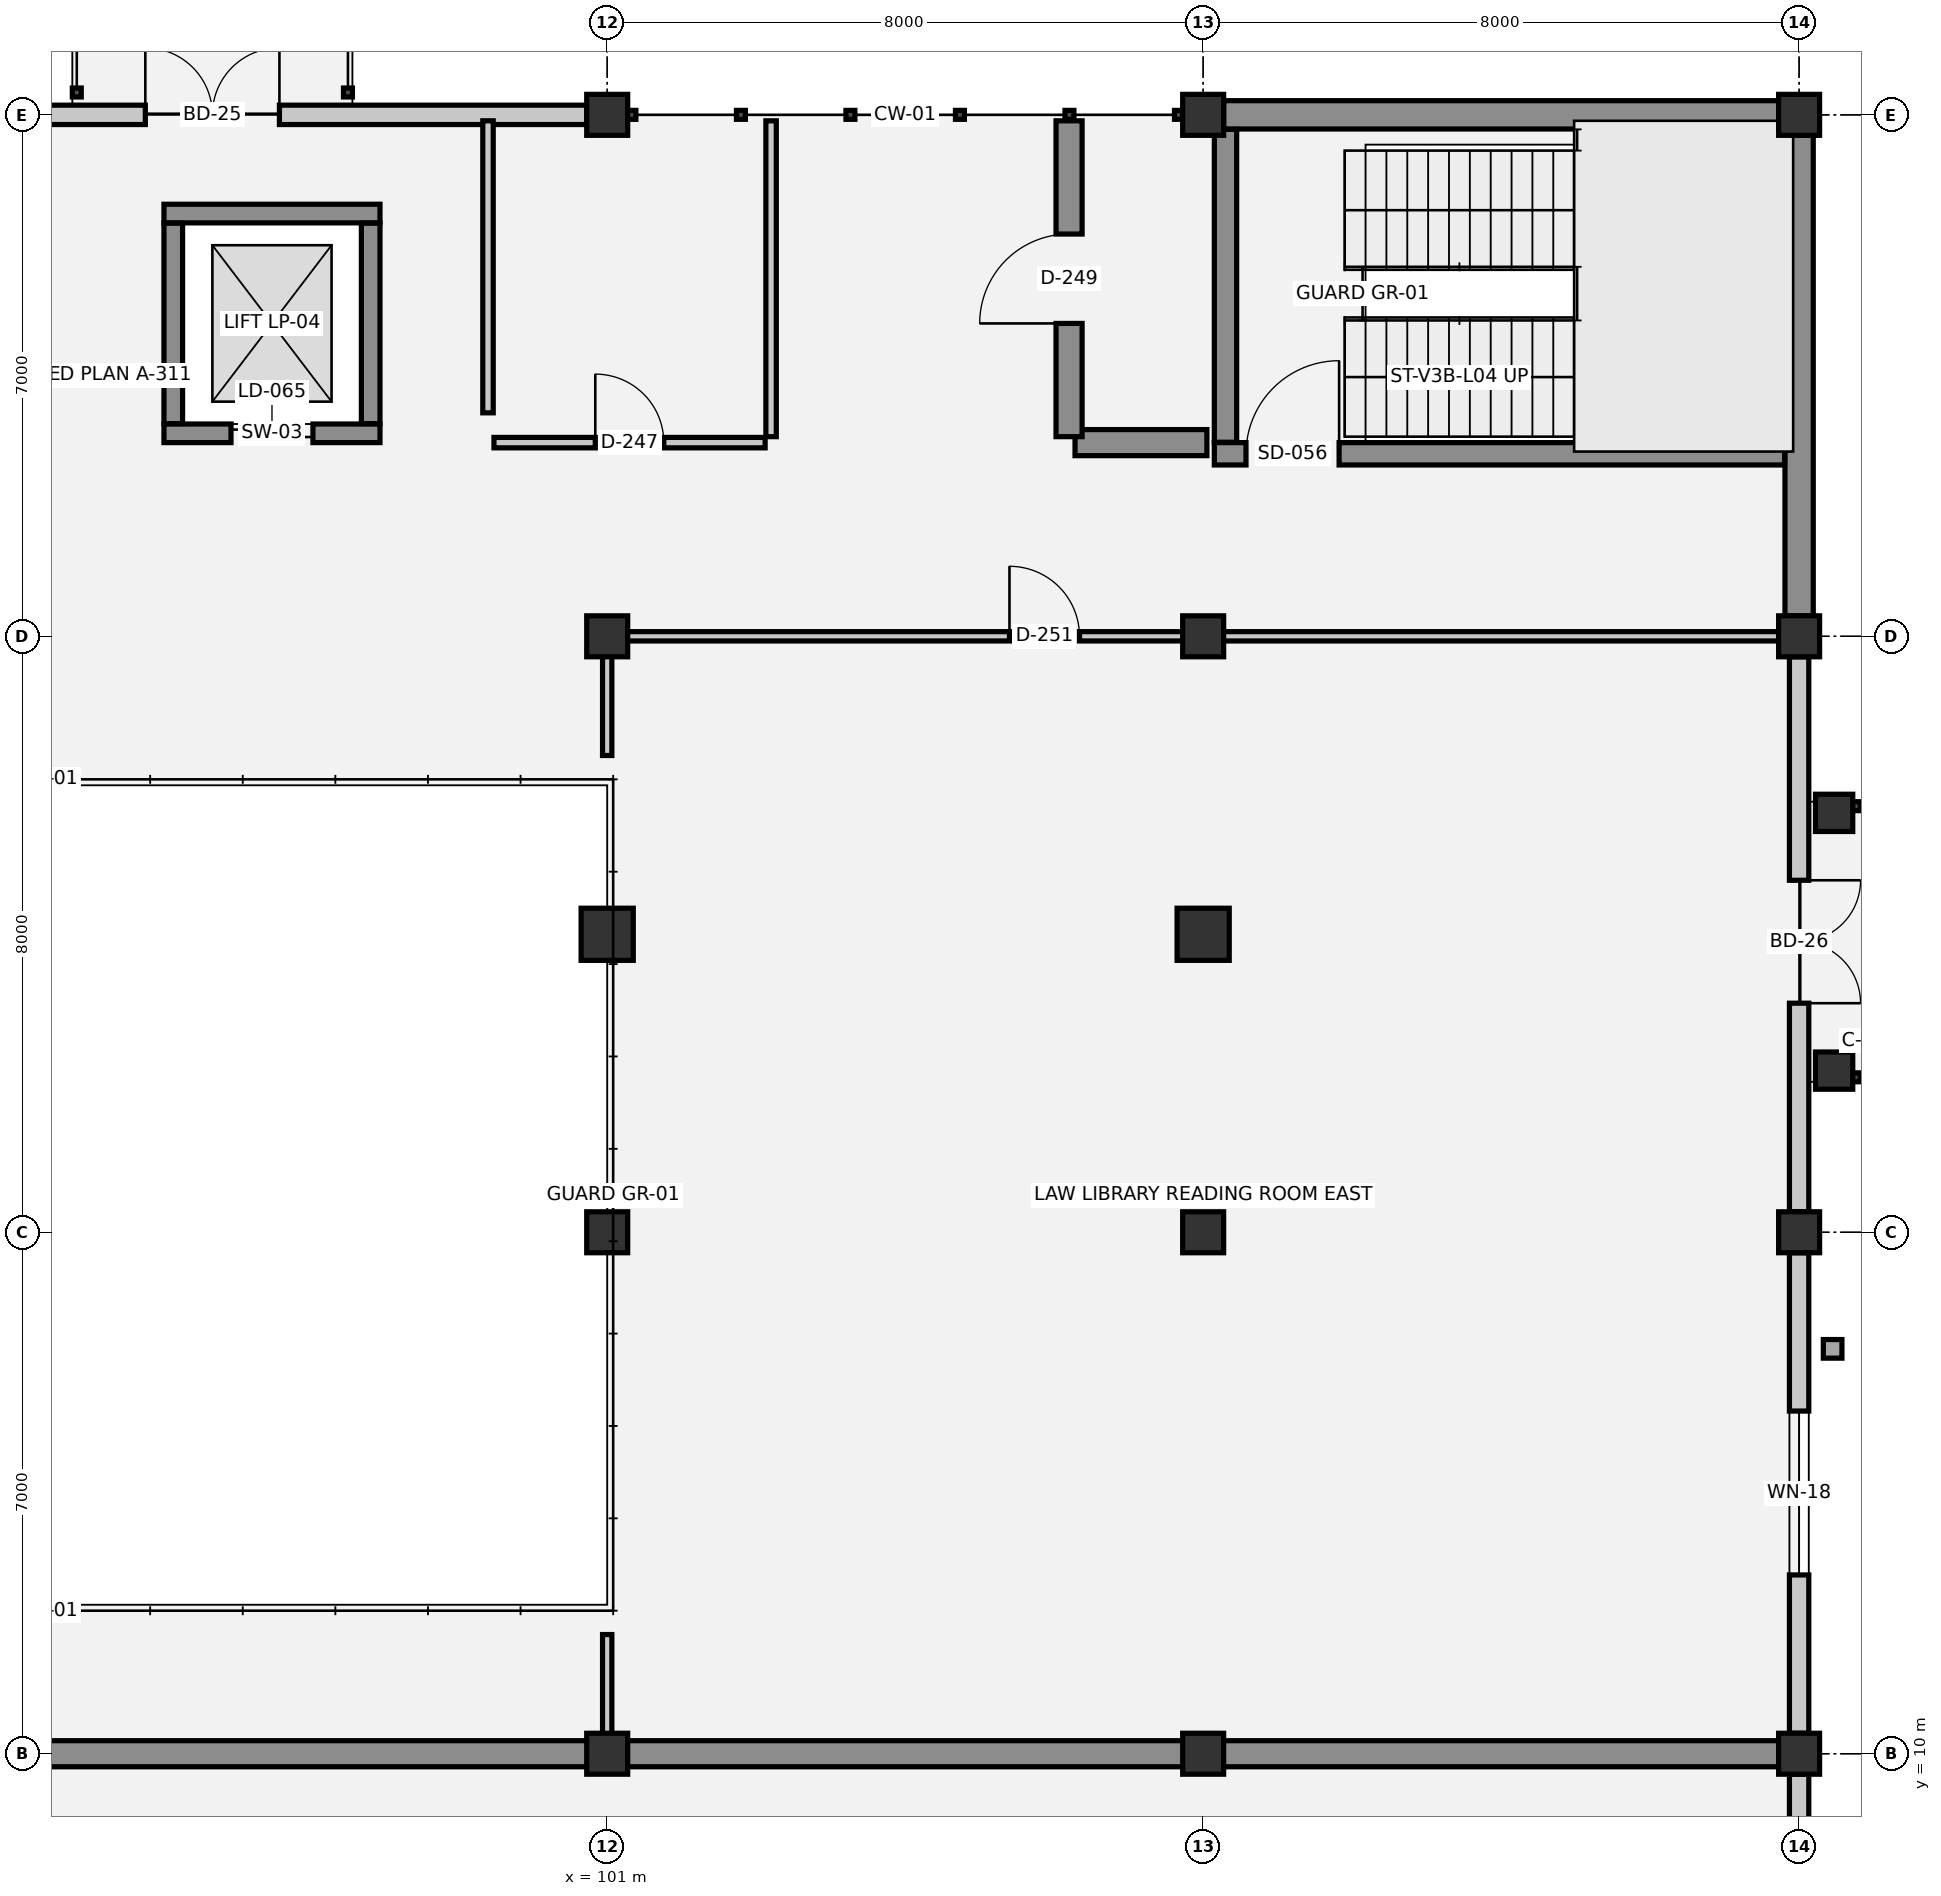
"""IFC4 building model, lengths in metres.
Left out: names, types, materials, properties, quantities, classifications, styles, units other than length and angle.
Written with IfcOpenShell. Run it as: python <this file> out.ifc"""

import sys

from ifc_helpers import new_model, si_unit, direction, frame, frame_2d, origin, origin_2d, place, context, subcontext, project, spatial, rectangle, circle, extrude, element, fill, save


model = new_model("IFC4")
c1 = context("Model", 3, precision=1e-05, world=origin(), true_north=direction((0.0, 1.0)))
c2 = subcontext(c1, "Body", "Model", "MODEL_VIEW")
j1 = project(units=[si_unit("LENGTHUNIT", "METRE"), si_unit("PLANEANGLEUNIT", "RADIAN")], contexts=[c1])
p1 = place(None, origin())
s1 = spatial("IfcSite", under=j1, at=p1, CompositionType="ELEMENT")
p2 = place(p1, origin())
s2 = spatial("IfcBuilding", under=s1, at=p2, CompositionType="ELEMENT")
p3 = place(p2, frame((0.0, 0.0, 14.4)))
s3 = spatial("IfcBuildingStorey", under=s2, at=p3, CompositionType="ELEMENT", Elevation=14.4)
for number, where, z_axis, x_axis in (
    (1, (101.0, 10.0, 0.0), (0.0, 0.0, 1.0), (1.0, 0.0, 0.0)),
    (2, (101.0, 17.0, 0.0), (0.0, 0.0, 1.0), (1.0, 0.0, 0.0)),
    (3, (101.0, 25.0, 0.0), (0.0, 0.0, 1.0), (1.0, 0.0, 0.0)),
    (4, (101.0, 32.0, 0.0), (0.0, 0.0, 1.0), (1.0, 0.0, 0.0)),
    (5, (109.0, 10.0, 0.0), (0.0, 0.0, 1.0), (1.0, 0.0, 0.0)),
    (6, (109.0, 17.0, 0.0), (0.0, 0.0, 1.0), (1.0, 0.0, 0.0)),
    (7, (109.0, 25.0, 0.0), (0.0, 0.0, 1.0), (1.0, 0.0, 0.0)),
    (8, (109.0, 32.0, 0.0), (0.0, 0.0, 1.0), (1.0, 0.0, 0.0)),
    (9, (117.0, 10.0, 0.0), (0.0, 0.0, 1.0), (1.0, 0.0, 0.0)),
    (10, (117.0, 17.0, 0.0), (0.0, 0.0, 1.0), (1.0, 0.0, 0.0)),
    (11, (117.0, 25.0, 0.0), (0.0, 0.0, 1.0), (1.0, 0.0, 0.0)),
    (12, (117.0, 32.0, 0.0), (0.0, 0.0, 1.0), (1.0, 0.0, 0.0)),
):
    element("IfcColumn", number, at=place(p3, frame(where, z_axis=z_axis, x_axis=x_axis)), inside=s3, PredefinedType="COLUMN", context=c2, shape_type="SweptSolid", body=[
        extrude(rectangle(XDim=0.55, YDim=0.55, at=origin_2d()), origin(), (0.0, 0.0, 1.0), 3.9),
    ])
for number, where, z_axis, x_axis in (
    (13, (101.0, 21.0, 0.0), (0.0, 0.0, 1.0), (1.0, 0.0, 0.0)),
    (14, (109.0, 21.0, 0.0), (0.0, 0.0, 1.0), (1.0, 0.0, 0.0)),
):
    element("IfcColumn", number, at=place(p3, frame(where, z_axis=z_axis, x_axis=x_axis)), inside=s3, PredefinedType="COLUMN", context=c2, shape_type="SweptSolid", body=[
        extrude(circle(Radius=0.35, at=origin_2d()), origin(), (0.0, 0.0, 1.0), 3.9),
    ])
for number, where, z_axis, x_axis in (
    (15, (117.47, 19.17, 0.0), (0.0, 0.0, 1.0), (1.0, 0.0, 0.0)),
    (16, (117.47, 22.63, 0.0), (0.0, 0.0, 1.0), (1.0, 0.0, 0.0)),
):
    element("IfcColumn", number, at=place(p3, frame(where, z_axis=z_axis, x_axis=x_axis)), inside=s3, PredefinedType="COLUMN", context=c2, shape_type="SweptSolid", body=[
        extrude(rectangle(XDim=0.5, YDim=0.5, at=origin_2d()), origin(), (0.0, 0.0, 1.0), 3.67),
    ])
p4 = place(p3, frame((93.275, 32.0, 0.0), z_axis=(0.0, 0.0, 1.0), x_axis=(1.0, 0.0, 0.0)))
e17 = element("IfcWall", 17, at=p4, inside=s3, PredefinedType="SOLIDWALL", context=c2, shape_type="SweptSolid", body=[
    extrude(rectangle(XDim=7.45, YDim=0.26, at=frame_2d((3.725, 0.0))), origin(), (0.0, 0.0, 1.0), 2.84),
])
p5 = place(p4, frame((1.525, 0.0, 0.0)))
e18 = element("IfcOpeningElement", 18, at=p5, cuts=e17, PredefinedType="OPENING", context=c2, shape_type="SweptSolid", body=[
    extrude(rectangle(XDim=1.8, YDim=2.25, at=frame_2d((0.9, 1.125))), frame((0.0, 0.14, 0.0), z_axis=(0.0, -1.0, 0.0), x_axis=(1.0, 0.0, 0.0)), (0.0, 0.0, 1.0), 0.28),
])
p6 = place(p3, frame((109.275, 32.0, 0.0), z_axis=(0.0, 0.0, 1.0), x_axis=(1.0, 0.0, 0.0)))
e19 = element("IfcWall", 19, at=p6, inside=s3, PredefinedType="STANDARD", context=c2, shape_type="SweptSolid", body=[
    extrude(rectangle(XDim=7.45, YDim=0.38, at=frame_2d((3.725, 0.0))), origin(), (0.0, 0.0, 1.0), 2.84),
])
p7 = place(p3, frame((117.0, 31.725, 0.0), z_axis=(0.0, 0.0, 1.0), x_axis=(0.0, -1.0, 0.0)))
e20 = element("IfcWall", 20, at=p7, inside=s3, PredefinedType="STANDARD", context=c2, shape_type="SweptSolid", body=[
    extrude(rectangle(XDim=6.45, YDim=0.38, at=frame_2d((3.225, 0.0))), origin(), (0.0, 0.0, 1.0), 2.84),
])
p8 = place(p3, frame((117.0, 24.725, 0.0), z_axis=(0.0, 0.0, 1.0), x_axis=(0.0, -1.0, 0.0)))
e21 = element("IfcWall", 21, at=p8, inside=s3, PredefinedType="SOLIDWALL", context=c2, shape_type="SweptSolid", body=[
    extrude(rectangle(XDim=7.45, YDim=0.26, at=frame_2d((3.725, 0.0))), origin(), (0.0, 0.0, 1.0), 2.84),
])
p9 = place(p8, frame((3.0, 0.0, 0.0)))
e22 = element("IfcOpeningElement", 22, at=p9, cuts=e21, PredefinedType="OPENING", context=c2, shape_type="SweptSolid", body=[
    extrude(rectangle(XDim=1.65, YDim=2.2, at=frame_2d((0.825, 1.1))), frame((0.0, 0.14, 0.0), z_axis=(0.0, -1.0, 0.0), x_axis=(1.0, 0.0, 0.0)), (0.0, 0.0, 1.0), 0.28),
])
p10 = place(p3, frame((117.0, 16.725, 0.0), z_axis=(0.0, 0.0, 1.0), x_axis=(0.0, -1.0, 0.0)))
e23 = element("IfcWall", 23, at=p10, inside=s3, PredefinedType="SOLIDWALL", context=c2, shape_type="SweptSolid", body=[
    extrude(rectangle(XDim=6.45, YDim=0.26, at=frame_2d((3.225, 0.0))), origin(), (0.0, 0.0, 1.0), 2.84),
])
p11 = place(p10, frame((2.125, 0.0, 0.9)))
e24 = element("IfcOpeningElement", 24, at=p11, cuts=e23, PredefinedType="OPENING", context=c2, shape_type="SweptSolid", body=[
    extrude(rectangle(XDim=2.2, YDim=1.0, at=frame_2d((1.1, 0.5))), frame((0.0, 0.14, 0.0), z_axis=(0.0, -1.0, 0.0), x_axis=(1.0, 0.0, 0.0)), (0.0, 0.0, 1.0), 0.28),
])
p12 = place(p3, frame((117.0, 9.725, 0.0), z_axis=(0.0, 0.0, 1.0), x_axis=(0.0, -1.0, 0.0)))
e25 = element("IfcWall", 25, at=p12, inside=s3, PredefinedType="SOLIDWALL", context=c2, shape_type="SweptSolid", body=[
    extrude(rectangle(XDim=5.45, YDim=0.26, at=frame_2d((2.725, 0.0))), origin(), (0.0, 0.0, 1.0), 2.84),
])
p13 = place(p12, frame((2.175, 0.0, 0.9)))
e26 = element("IfcOpeningElement", 26, at=p13, cuts=e25, PredefinedType="OPENING", context=c2, shape_type="SweptSolid", body=[
    extrude(rectangle(XDim=1.1, YDim=1.2, at=frame_2d((0.55, 0.6))), frame((0.0, 0.14, 0.0), z_axis=(0.0, -1.0, 0.0), x_axis=(1.0, 0.0, 0.0)), (0.0, 0.0, 1.0), 0.28),
])
p14 = place(p3, frame((95.05, 27.725, 0.0), z_axis=(0.0, 0.0, 1.0), x_axis=(1.0, 0.0, 0.0)))
e27 = element("IfcWall", 27, at=p14, inside=s3, PredefinedType="SHEAR", context=c2, shape_type="SweptSolid", body=[
    extrude(rectangle(XDim=2.9, YDim=0.25, at=frame_2d((1.45, 0.0))), origin(), (0.0, 0.0, 1.0), 3.9),
])
p15 = place(p14, frame((0.9, 0.0, 0.0)))
e28 = element("IfcOpeningElement", 28, at=p15, cuts=e27, PredefinedType="OPENING", context=c2, shape_type="SweptSolid", body=[
    extrude(rectangle(XDim=1.1, YDim=2.15, at=frame_2d((0.55, 1.075))), frame((0.0, 0.135, 0.0), z_axis=(0.0, -1.0, 0.0), x_axis=(1.0, 0.0, 0.0)), (0.0, 0.0, 1.0), 0.27),
])
p16 = place(p3, frame((97.95, 30.675, 0.0), z_axis=(0.0, 0.0, 1.0), x_axis=(-1.0, 0.0, 0.0)))
e29 = element("IfcWall", 29, at=p16, inside=s3, PredefinedType="SHEAR", context=c2, shape_type="SweptSolid", body=[
    extrude(rectangle(XDim=2.9, YDim=0.25, at=frame_2d((1.45, 0.0))), origin(), (0.0, 0.0, 1.0), 3.9),
])
for number, where, z_axis, x_axis in (
    (30, (95.175, 30.545, 0.0), (0.0, 0.0, 1.0), (0.0, -1.0, 0.0)),
    (31, (97.825, 27.855, 0.0), (0.0, 0.0, 1.0), (0.0, 1.0, 0.0)),
):
    element("IfcWall", number, at=place(p3, frame(where, z_axis=z_axis, x_axis=x_axis)), inside=s3, PredefinedType="SHEAR", context=c2, shape_type="SweptSolid", body=[
        extrude(rectangle(XDim=2.69, YDim=0.25, at=frame_2d((1.345, 0.0))), origin(), (0.0, 0.0, 1.0), 3.9),
    ])
p17 = place(p3, frame((109.15, 27.45, 0.0), z_axis=(0.0, 0.0, 1.0), x_axis=(1.0, 0.0, 0.0)))
e32 = element("IfcWall", 32, at=p17, inside=s3, PredefinedType="SHEAR", context=c2, shape_type="SweptSolid", body=[
    extrude(rectangle(XDim=7.655, YDim=0.3, at=frame_2d((3.828, 0.0))), origin(), (0.0, 0.0, 1.0), 3.56),
])
p18 = place(p17, frame((0.425, 0.0, 0.0)))
e33 = element("IfcOpeningElement", 33, at=p18, cuts=e32, PredefinedType="OPENING", context=c2, shape_type="SweptSolid", body=[
    extrude(rectangle(XDim=1.25, YDim=2.15, at=frame_2d((0.625, 1.075))), frame((0.0, 0.16, 0.0), z_axis=(0.0, -1.0, 0.0), x_axis=(1.0, 0.0, 0.0)), (0.0, 0.0, 1.0), 0.32),
])
p19 = place(p3, frame((109.3, 31.805, 0.0), z_axis=(0.0, 0.0, 1.0), x_axis=(0.0, -1.0, 0.0)))
e34 = element("IfcWall", 34, at=p19, inside=s3, PredefinedType="SHEAR", context=c2, shape_type="SweptSolid", body=[
    extrude(rectangle(XDim=4.2, YDim=0.3, at=frame_2d((2.1, 0.0))), origin(), (0.0, 0.0, 1.0), 3.56),
])
p20 = place(p3, frame((82.48, 10.0, 0.0), z_axis=(0.0, 0.0, 1.0), x_axis=(1.0, 0.0, 0.0)))
e35 = element("IfcWall", 35, at=p20, inside=s3, PredefinedType="SHEAR", context=c2, shape_type="SweptSolid", body=[
    extrude(rectangle(XDim=18.44, YDim=0.35, at=frame_2d((9.22, 0.0))), origin(), (0.0, 0.0, 1.0), 3.54),
])
p21 = place(p20, frame((6.139, 0.0, 0.0)))
e36 = element("IfcOpeningElement", 36, at=p21, cuts=e35, PredefinedType="OPENING", context=c2, shape_type="SweptSolid", body=[
    extrude(rectangle(XDim=1.2, YDim=2.15, at=frame_2d((0.6, 1.075))), frame((0.0, 0.185, 0.0), z_axis=(0.0, -1.0, 0.0), x_axis=(1.0, 0.0, 0.0)), (0.0, 0.0, 1.0), 0.37),
])
p22 = place(p3, frame((101.08, 10.0, 0.0), z_axis=(0.0, 0.0, 1.0), x_axis=(1.0, 0.0, 0.0)))
e37 = element("IfcWall", 37, at=p22, inside=s3, PredefinedType="SHEAR", context=c2, shape_type="SweptSolid", body=[
    extrude(rectangle(XDim=15.84, YDim=0.35, at=frame_2d((7.92, 0.0))), origin(), (0.0, 0.0, 1.0), 3.54),
])
p23 = place(p3, frame((101.08, 25.0, 0.0), z_axis=(0.0, 0.0, 1.0), x_axis=(1.0, 0.0, 0.0)))
e38 = element("IfcWall", 38, at=p23, inside=s3, PredefinedType="PARTITIONING", context=c2, shape_type="SweptSolid", body=[
    extrude(rectangle(XDim=15.84, YDim=0.125, at=frame_2d((7.92, 0.0))), origin(), (0.0, 0.0, 1.0), 2.96),
])
p24 = place(p23, frame((5.32, 0.0, 0.0)))
e39 = element("IfcOpeningElement", 39, at=p24, cuts=e38, PredefinedType="OPENING", context=c2, shape_type="SweptSolid", body=[
    extrude(rectangle(XDim=0.94, YDim=2.1, at=frame_2d((0.47, 1.05))), frame((0.0, 0.073, 0.0), z_axis=(0.0, -1.0, 0.0), x_axis=(1.0, 0.0, 0.0)), (0.0, 0.0, 1.0), 0.145),
])
p25 = place(p3, frame((99.48, 27.6, 0.0), z_axis=(0.0, 0.0, 1.0), x_axis=(1.0, 0.0, 0.0)))
e40 = element("IfcWall", 40, at=p25, inside=s3, PredefinedType="PLUMBINGWALL", context=c2, shape_type="SweptSolid", body=[
    extrude(rectangle(XDim=3.64, YDim=0.14, at=frame_2d((1.82, 0.0))), origin(), (0.0, 0.0, 1.0), 3.54),
])
p26 = place(p25, frame((1.36, 0.0, 0.0)))
e41 = element("IfcOpeningElement", 41, at=p26, cuts=e40, PredefinedType="OPENING", context=c2, shape_type="SweptSolid", body=[
    extrude(rectangle(XDim=0.92, YDim=2.1, at=frame_2d((0.46, 1.05))), frame((0.0, 0.08, 0.0), z_axis=(0.0, -1.0, 0.0), x_axis=(1.0, 0.0, 0.0)), (0.0, 0.0, 1.0), 0.16),
])
p27 = place(p3, frame((107.28, 27.6, 0.0), z_axis=(0.0, 0.0, 1.0), x_axis=(1.0, 0.0, 0.0)))
e42 = element("IfcWall", 42, at=p27, inside=s3, PredefinedType="SHEAR", context=c2, shape_type="SweptSolid", body=[
    extrude(rectangle(XDim=1.77, YDim=0.35, at=frame_2d((0.885, 0.0))), origin(), (0.0, 0.0, 1.0), 3.54),
])
p28 = place(p3, frame((99.4, 28.0, 0.0), z_axis=(0.0, 0.0, 1.0), x_axis=(0.0, 1.0, 0.0)))
e43 = element("IfcWall", 43, at=p28, inside=s3, PredefinedType="PLUMBINGWALL", context=c2, shape_type="SweptSolid", body=[
    extrude(rectangle(XDim=3.92, YDim=0.14, at=frame_2d((1.96, 0.0))), origin(), (0.0, 0.0, 1.0), 3.54),
])
for number, where, z_axis, x_axis in (
    (44, (101.0, 10.08, 0.0), (0.0, 0.0, 1.0), (0.0, 1.0, 0.0)),
    (45, (101.0, 23.4, 0.0), (0.0, 0.0, 1.0), (0.0, 1.0, 0.0)),
):
    element("IfcWall", number, at=place(p3, frame(where, z_axis=z_axis, x_axis=x_axis)), inside=s3, PredefinedType="PARTITIONING", context=c2, shape_type="SweptSolid", body=[
        extrude(rectangle(XDim=1.52, YDim=0.125, at=frame_2d((0.76, 0.0))), origin(), (0.0, 0.0, 1.0), 3.01),
    ])
p29 = place(p3, frame((103.2, 27.68, 0.0), z_axis=(0.0, 0.0, 1.0), x_axis=(0.0, 1.0, 0.0)))
e46 = element("IfcWall", 46, at=p29, inside=s3, PredefinedType="PLUMBINGWALL", context=c2, shape_type="SweptSolid", body=[
    extrude(rectangle(XDim=4.24, YDim=0.14, at=frame_2d((2.12, 0.0))), origin(), (0.0, 0.0, 1.0), 3.54),
])
p30 = place(p3, frame((107.2, 27.68, 0.0), z_axis=(0.0, 0.0, 1.0), x_axis=(0.0, 1.0, 0.0)))
e47 = element("IfcWall", 47, at=p30, inside=s3, PredefinedType="SHEAR", context=c2, shape_type="SweptSolid", body=[
    extrude(rectangle(XDim=4.24, YDim=0.35, at=frame_2d((2.12, 0.0))), origin(), (0.0, 0.0, 1.0), 3.54),
])
p31 = place(p30, frame((1.52, 0.0, 0.0)))
e48 = element("IfcOpeningElement", 48, at=p31, cuts=e47, PredefinedType="OPENING", context=c2, shape_type="SweptSolid", body=[
    extrude(rectangle(XDim=1.2, YDim=2.15, at=frame_2d((0.6, 1.075))), frame((0.0, 0.185, 0.0), z_axis=(0.0, -1.0, 0.0), x_axis=(1.0, 0.0, 0.0)), (0.0, 0.0, 1.0), 0.37),
])
p32 = place(p5, origin())
e49 = element("IfcDoor", 49, at=p32, inside=s3, OperationType="DOUBLE_DOOR_SINGLE_SWING", PredefinedType="DOOR", context=c2, shape_type="SweptSolid", body=[
    extrude(rectangle(XDim=1.8, YDim=2.25, at=frame_2d((0.9, 1.125))), frame((0.0, 0.025, 0.0), z_axis=(0.0, -1.0, 0.0), x_axis=(1.0, 0.0, 0.0)), (0.0, 0.0, 1.0), 0.05),
])
fill(e18, e49)
p33 = place(p9, origin())
e50 = element("IfcDoor", 50, at=p33, inside=s3, OperationType="DOUBLE_DOOR_SINGLE_SWING", PredefinedType="DOOR", context=c2, shape_type="SweptSolid", body=[
    extrude(rectangle(XDim=1.65, YDim=2.2, at=frame_2d((0.825, 1.1))), frame((0.0, 0.025, 0.0), z_axis=(0.0, -1.0, 0.0), x_axis=(1.0, 0.0, 0.0)), (0.0, 0.0, 1.0), 0.05),
])
fill(e22, e50)
p34 = place(p11, origin())
e51 = element("IfcWindow", 51, at=p34, inside=s3, PartitioningType="SINGLE_PANEL", PredefinedType="WINDOW", context=c2, shape_type="SweptSolid", body=[
    extrude(rectangle(XDim=2.2, YDim=1.0, at=frame_2d((1.1, 0.5))), frame((0.0, 0.03, 0.0), z_axis=(0.0, -1.0, 0.0), x_axis=(1.0, 0.0, 0.0)), (0.0, 0.0, 1.0), 0.06),
])
fill(e24, e51)
p35 = place(p15, origin())
e52 = element("IfcDoor", 52, at=p35, inside=s3, OperationType="DOUBLE_DOOR_SLIDING", PredefinedType="DOOR", context=c2, shape_type="SweptSolid", body=[
    extrude(rectangle(XDim=1.1, YDim=2.15, at=frame_2d((0.55, 1.075))), frame((0.0, 0.025, 0.0), z_axis=(0.0, -1.0, 0.0), x_axis=(1.0, 0.0, 0.0)), (0.0, 0.0, 1.0), 0.05),
])
fill(e28, e52)
p36 = place(p18, origin())
e53 = element("IfcDoor", 53, at=p36, inside=s3, OperationType="SINGLE_SWING_RIGHT", PredefinedType="DOOR", context=c2, shape_type="SweptSolid", body=[
    extrude(rectangle(XDim=1.25, YDim=2.15, at=frame_2d((0.625, 1.075))), frame((0.0, 0.025, 0.0), z_axis=(0.0, -1.0, 0.0), x_axis=(1.0, 0.0, 0.0)), (0.0, 0.0, 1.0), 0.05),
])
fill(e33, e53)
p37 = place(p26, origin())
e54 = element("IfcDoor", 54, at=p37, inside=s3, OperationType="SINGLE_SWING_LEFT", PredefinedType="DOOR", context=c2, shape_type="SweptSolid", body=[
    extrude(rectangle(XDim=0.92, YDim=2.1, at=frame_2d((0.46, 1.05))), frame((0.0, 0.025, 0.0), z_axis=(0.0, -1.0, 0.0), x_axis=(1.0, 0.0, 0.0)), (0.0, 0.0, 1.0), 0.05),
])
fill(e41, e54)
p38 = place(p31, origin())
e55 = element("IfcDoor", 55, at=p38, inside=s3, OperationType="SINGLE_SWING_LEFT", PredefinedType="DOOR", context=c2, shape_type="SweptSolid", body=[
    extrude(rectangle(XDim=1.2, YDim=2.15, at=frame_2d((0.6, 1.075))), frame((0.0, 0.025, 0.0), z_axis=(0.0, -1.0, 0.0), x_axis=(1.0, 0.0, 0.0)), (0.0, 0.0, 1.0), 0.05),
])
fill(e48, e55)
p39 = place(p24, origin())
e56 = element("IfcDoor", 56, at=p39, inside=s3, OperationType="SINGLE_SWING_LEFT", PredefinedType="DOOR", context=c2, shape_type="SweptSolid", body=[
    extrude(rectangle(XDim=0.94, YDim=2.1, at=frame_2d((0.47, 1.05))), frame((0.0, 0.025, 0.0), z_axis=(0.0, -1.0, 0.0), x_axis=(1.0, 0.0, 0.0)), (0.0, 0.0, 1.0), 0.05),
])
fill(e39, e56)
save(model, sys.argv[1])
